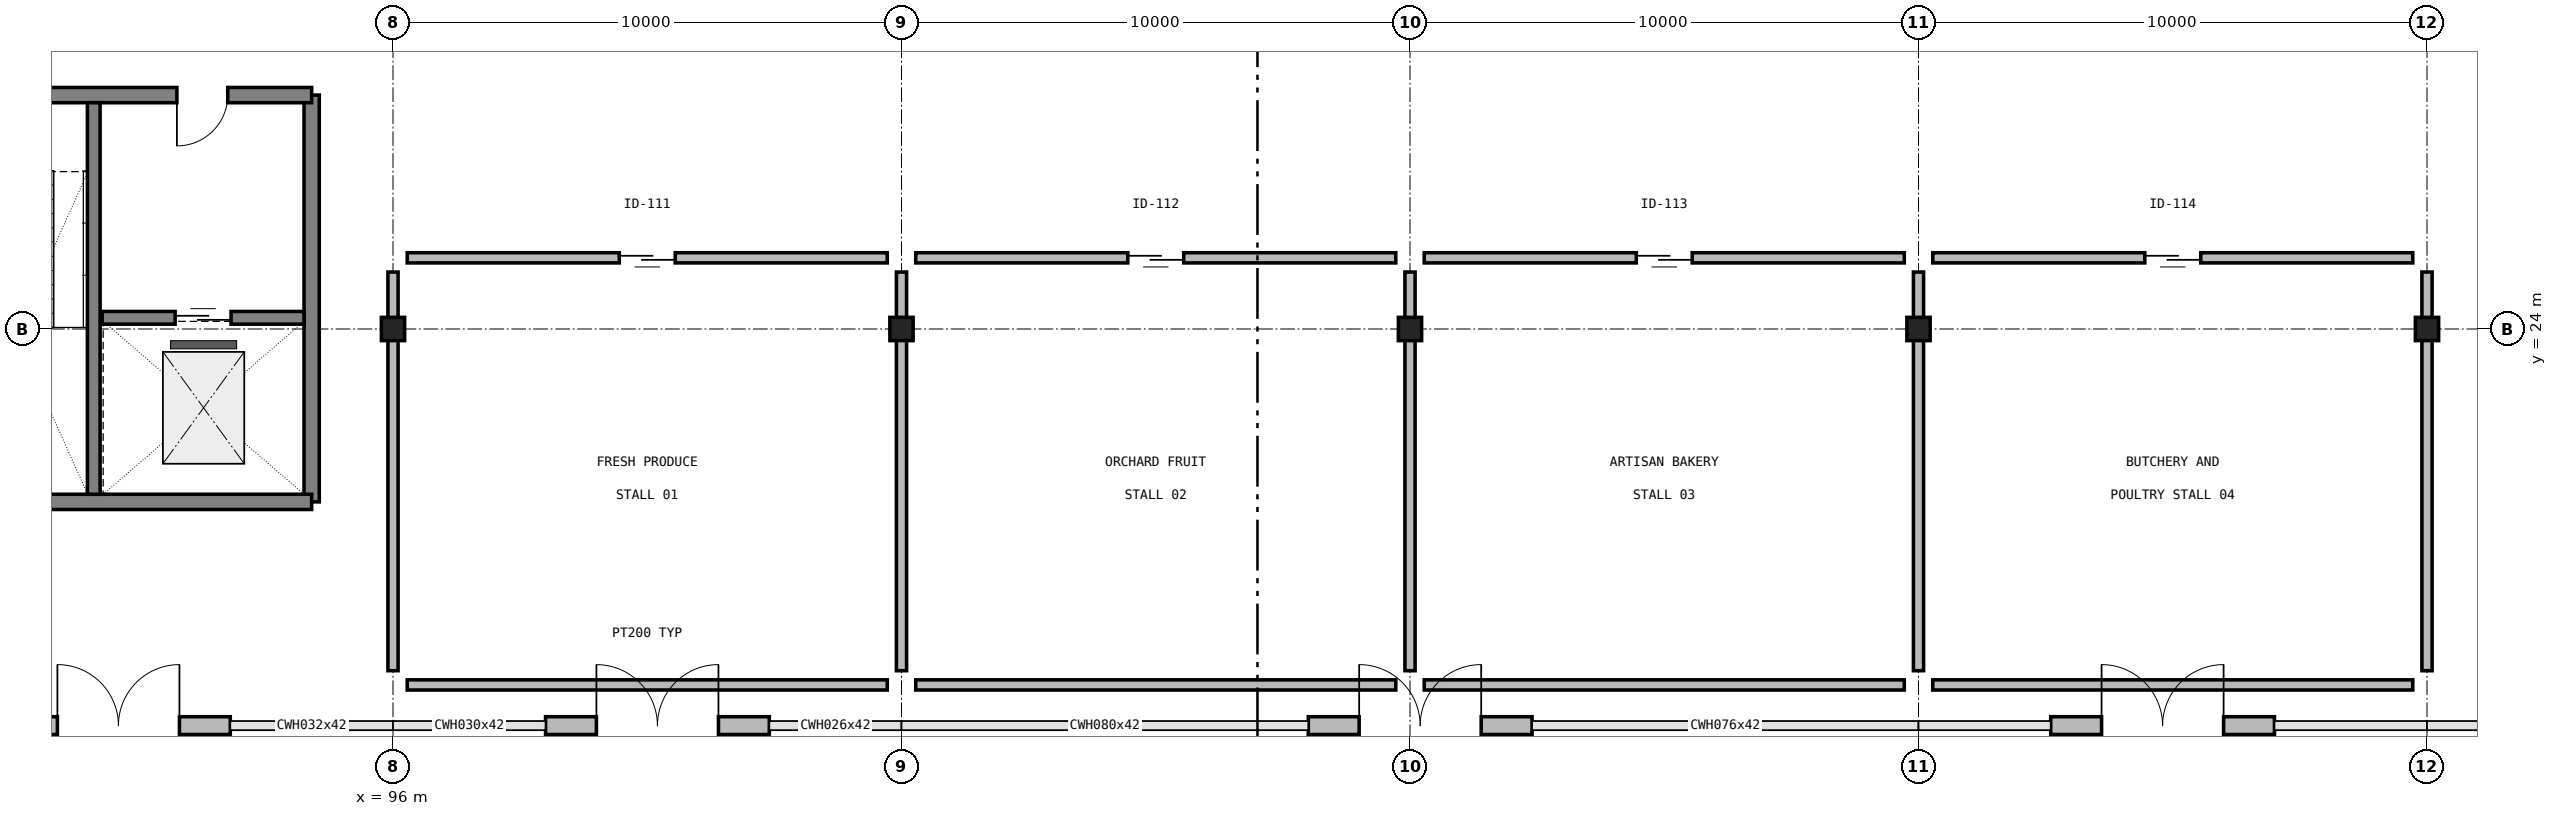
"""IFC4 building model, lengths in metres.
Left out: names, types, materials, properties, quantities, classifications, styles, units other than length and angle.
Written with IfcOpenShell. Run it as: python <this file> out.ifc"""

import sys

from ifc_helpers import new_model, si_unit, direction, frame, frame_2d, origin, origin_2d_with_axis, place, context, subcontext, project, spatial, rectangle, hollow_circle, extrude, element, fill, save


model = new_model("IFC4")
c1 = context("Model", 3, precision=1e-05, world=origin(), true_north=direction((0.0, 1.0)))
c2 = subcontext(c1, "Body", "Model", "MODEL_VIEW")
j1 = project(units=[si_unit("LENGTHUNIT", "METRE"), si_unit("PLANEANGLEUNIT", "RADIAN")], contexts=[c1])
p1 = place(None, origin())
s1 = spatial("IfcSite", under=j1, at=p1, CompositionType="ELEMENT")
p2 = place(p1, origin())
s2 = spatial("IfcBuilding", under=s1, at=p2, CompositionType="ELEMENT")
p3 = place(p2, origin())
s3 = spatial("IfcBuildingStorey", under=s2, at=p3, CompositionType="ELEMENT", Elevation=0.0)
for number, where, z_axis, x_axis in (
    (1, (96.0, 24.0, 0.0), (0.0, 0.0, 1.0), (1.0, 0.0, 0.0)),
    (2, (106.0, 24.0, 0.0), (0.0, 0.0, 1.0), (1.0, 0.0, 0.0)),
    (3, (116.0, 24.0, 0.0), (0.0, 0.0, 1.0), (1.0, 0.0, 0.0)),
    (4, (126.0, 24.0, 0.0), (0.0, 0.0, 1.0), (1.0, 0.0, 0.0)),
    (5, (136.0, 24.0, 0.0), (0.0, 0.0, 1.0), (1.0, 0.0, 0.0)),
):
    element("IfcColumn", number, at=place(p3, frame(where, z_axis=z_axis, x_axis=x_axis)), inside=s3, PredefinedType="COLUMN", context=c2, shape_type="SweptSolid", body=[
        extrude(hollow_circle(Radius=0.229, WallThickness=0.013, at=origin_2d_with_axis()), origin(), (0.0, 0.0, 1.0), 4.5),
    ])
p4 = place(p3, frame((88.4, 16.2, 0.0), z_axis=(0.0, 0.0, 1.0), x_axis=(1.0, 0.0, 0.0)))
e6 = element("IfcWall", 6, at=p4, inside=s3, PredefinedType="SOLIDWALL", context=c2, shape_type="SweptSolid", body=[
    extrude(rectangle(XDim=4.4, YDim=0.35, at=frame_2d((2.2, 0.0), x_axis=(1.0, 0.0))), origin(), (0.0, 0.0, 1.0), 4.24),
])
p5 = place(p4, frame((1.0, 0.0, 0.0)))
e7 = element("IfcOpeningElement", 7, at=p5, cuts=e6, PredefinedType="OPENING", context=c2, shape_type="SweptSolid", body=[
    extrude(rectangle(XDim=2.4, YDim=2.8, at=frame_2d((1.2, 1.4), x_axis=(1.0, 0.0))), frame((0.0, 0.185, 0.0), z_axis=(0.0, -1.0, 0.0), x_axis=(1.0, 0.0, 0.0)), (0.0, 0.0, 1.0), 0.37),
])
p6 = place(p3, frame((99.0, 16.2, 0.0), z_axis=(0.0, 0.0, 1.0), x_axis=(1.0, 0.0, 0.0)))
e8 = element("IfcWall", 8, at=p6, inside=s3, PredefinedType="SOLIDWALL", context=c2, shape_type="SweptSolid", body=[
    extrude(rectangle(XDim=4.4, YDim=0.35, at=frame_2d((2.2, 0.0), x_axis=(1.0, 0.0))), origin(), (0.0, 0.0, 1.0), 4.24),
])
p7 = place(p6, frame((1.0, 0.0, 0.0)))
e9 = element("IfcOpeningElement", 9, at=p7, cuts=e8, PredefinedType="OPENING", context=c2, shape_type="SweptSolid", body=[
    extrude(rectangle(XDim=2.4, YDim=2.8, at=frame_2d((1.2, 1.4), x_axis=(1.0, 0.0))), frame((0.0, 0.185, 0.0), z_axis=(0.0, -1.0, 0.0), x_axis=(1.0, 0.0, 0.0)), (0.0, 0.0, 1.0), 0.37),
])
p8 = place(p3, frame((114.0, 16.2, 0.0), z_axis=(0.0, 0.0, 1.0), x_axis=(1.0, 0.0, 0.0)))
e10 = element("IfcWall", 10, at=p8, inside=s3, PredefinedType="SOLIDWALL", context=c2, shape_type="SweptSolid", body=[
    extrude(rectangle(XDim=4.4, YDim=0.35, at=frame_2d((2.2, 0.0), x_axis=(1.0, 0.0))), origin(), (0.0, 0.0, 1.0), 4.24),
])
p9 = place(p8, frame((1.0, 0.0, 0.0)))
e11 = element("IfcOpeningElement", 11, at=p9, cuts=e10, PredefinedType="OPENING", context=c2, shape_type="SweptSolid", body=[
    extrude(rectangle(XDim=2.4, YDim=2.8, at=frame_2d((1.2, 1.4), x_axis=(1.0, 0.0))), frame((0.0, 0.185, 0.0), z_axis=(0.0, -1.0, 0.0), x_axis=(1.0, 0.0, 0.0)), (0.0, 0.0, 1.0), 0.37),
])
p10 = place(p3, frame((128.6, 16.2, 0.0), z_axis=(0.0, 0.0, 1.0), x_axis=(1.0, 0.0, 0.0)))
e12 = element("IfcWall", 12, at=p10, inside=s3, PredefinedType="SOLIDWALL", context=c2, shape_type="SweptSolid", body=[
    extrude(rectangle(XDim=4.4, YDim=0.35, at=frame_2d((2.2, 0.0), x_axis=(1.0, 0.0))), origin(), (0.0, 0.0, 1.0), 4.24),
])
p11 = place(p10, frame((1.0, 0.0, 0.0)))
e13 = element("IfcOpeningElement", 13, at=p11, cuts=e12, PredefinedType="OPENING", context=c2, shape_type="SweptSolid", body=[
    extrude(rectangle(XDim=2.4, YDim=2.8, at=frame_2d((1.2, 1.4), x_axis=(1.0, 0.0))), frame((0.0, 0.185, 0.0), z_axis=(0.0, -1.0, 0.0), x_axis=(1.0, 0.0, 0.0)), (0.0, 0.0, 1.0), 0.37),
])
p12 = place(p3, frame((94.4, 20.6, 0.0), z_axis=(0.0, 0.0, 1.0), x_axis=(0.0, 1.0, 0.0)))
e14 = element("IfcWall", 14, at=p12, inside=s3, PredefinedType="SHEAR", context=c2, shape_type="SweptSolid", body=[
    extrude(rectangle(XDim=8.0, YDim=0.3, at=frame_2d((4.0, 0.0), x_axis=(1.0, 0.0))), origin(), (0.0, 0.0, 1.0), 4.5),
])
p13 = place(p3, frame((87.0, 20.6, 0.0), z_axis=(0.0, 0.0, 1.0), x_axis=(1.0, 0.0, 0.0)))
e15 = element("IfcWall", 15, at=p13, inside=s3, PredefinedType="SHEAR", context=c2, shape_type="SweptSolid", body=[
    extrude(rectangle(XDim=7.4, YDim=0.3, at=frame_2d((3.7, 0.0), x_axis=(1.0, 0.0))), origin(), (0.0, 0.0, 1.0), 4.5),
])
p14 = place(p3, frame((94.4, 28.6, 0.0), z_axis=(0.0, 0.0, 1.0), x_axis=(-1.0, 0.0, 0.0)))
e16 = element("IfcWall", 16, at=p14, inside=s3, PredefinedType="SHEAR", context=c2, shape_type="SweptSolid", body=[
    extrude(rectangle(XDim=7.4, YDim=0.3, at=frame_2d((3.7, 0.0), x_axis=(1.0, 0.0))), origin(), (0.0, 0.0, 1.0), 4.5),
])
p15 = place(p14, frame((1.65, 0.0, 0.0)))
e17 = element("IfcOpeningElement", 17, at=p15, cuts=e16, PredefinedType="OPENING", context=c2, shape_type="SweptSolid", body=[
    extrude(rectangle(XDim=1.0, YDim=2.15, at=frame_2d((0.5, 1.075), x_axis=(1.0, 0.0))), frame((0.0, 0.16, 0.0), z_axis=(0.0, -1.0, 0.0), x_axis=(1.0, 0.0, 0.0)), (0.0, 0.0, 1.0), 0.32),
])
p16 = place(p14, frame((5.3, 0.0, 0.0)))
e18 = element("IfcOpeningElement", 18, at=p16, cuts=e16, PredefinedType="OPENING", context=c2, shape_type="SweptSolid", body=[
    extrude(rectangle(XDim=1.0, YDim=2.15, at=frame_2d((0.5, 1.075), x_axis=(1.0, 0.0))), frame((0.0, 0.16, 0.0), z_axis=(0.0, -1.0, 0.0), x_axis=(1.0, 0.0, 0.0)), (0.0, 0.0, 1.0), 0.32),
])
p17 = place(p3, frame((90.115, 20.75, 0.0), z_axis=(0.0, 0.0, 1.0), x_axis=(0.0, 1.0, 0.0)))
e19 = element("IfcWall", 19, at=p17, inside=s3, PredefinedType="SHEAR", context=c2, shape_type="SweptSolid", body=[
    extrude(rectangle(XDim=7.7, YDim=0.25, at=frame_2d((3.85, 0.0), x_axis=(1.0, 0.0))), origin(), (0.0, 0.0, 1.0), 4.5),
])
p18 = place(p3, frame((90.28, 24.22, 0.0), z_axis=(0.0, 0.0, 1.0), x_axis=(1.0, 0.0, 0.0)))
e20 = element("IfcWall", 20, at=p18, inside=s3, PredefinedType="SHEAR", context=c2, shape_type="SweptSolid", body=[
    extrude(rectangle(XDim=3.97, YDim=0.25, at=frame_2d((1.985, 0.0), x_axis=(1.0, 0.0))), origin(), (0.0, 0.0, 1.0), 4.24),
])
p19 = place(p18, frame((1.435, 0.0, 0.0)))
e21 = element("IfcOpeningElement", 21, at=p19, cuts=e20, PredefinedType="OPENING", context=c2, shape_type="SweptSolid", body=[
    extrude(rectangle(XDim=1.1, YDim=2.15, at=frame_2d((0.55, 1.075), x_axis=(1.0, 0.0))), frame((0.0, 0.135, 0.0), z_axis=(0.0, -1.0, 0.0), x_axis=(1.0, 0.0, 0.0)), (0.0, 0.0, 1.0), 0.27),
])
p20 = place(p3, frame((96.28, 17.0, 0.0), z_axis=(0.0, 0.0, 1.0), x_axis=(1.0, 0.0, 0.0)))
e22 = element("IfcWall", 22, at=p20, inside=s3, PredefinedType="MOVABLE", context=c2, shape_type="SweptSolid", body=[
    extrude(rectangle(XDim=9.44, YDim=0.2, at=frame_2d((4.72, 0.0), x_axis=(1.0, 0.0))), origin(), (0.0, 0.0, 1.0), 3.62),
])
p21 = place(p3, frame((106.0, 17.28, 0.0), z_axis=(0.0, 0.0, 1.0), x_axis=(0.0, 1.0, 0.0)))
e23 = element("IfcWall", 23, at=p21, inside=s3, PredefinedType="MOVABLE", context=c2, shape_type="SweptSolid", body=[
    extrude(rectangle(XDim=7.84, YDim=0.2, at=frame_2d((3.92, 0.0), x_axis=(1.0, 0.0))), origin(), (0.0, 0.0, 1.0), 3.62),
])
p22 = place(p3, frame((105.72, 25.4, 0.0), z_axis=(0.0, 0.0, 1.0), x_axis=(-1.0, 0.0, 0.0)))
e24 = element("IfcWall", 24, at=p22, inside=s3, PredefinedType="MOVABLE", context=c2, shape_type="SweptSolid", body=[
    extrude(rectangle(XDim=9.44, YDim=0.2, at=frame_2d((4.72, 0.0), x_axis=(1.0, 0.0))), origin(), (0.0, 0.0, 1.0), 3.62),
])
p23 = place(p22, frame((4.17, 0.0, 0.0)))
e25 = element("IfcOpeningElement", 25, at=p23, cuts=e24, PredefinedType="OPENING", context=c2, shape_type="SweptSolid", body=[
    extrude(rectangle(XDim=1.1, YDim=2.15, at=frame_2d((0.55, 1.075), x_axis=(1.0, 0.0))), frame((0.0, 0.11, 0.0), z_axis=(0.0, -1.0, 0.0), x_axis=(1.0, 0.0, 0.0)), (0.0, 0.0, 1.0), 0.22),
])
p24 = place(p3, frame((96.0, 25.12, 0.0), z_axis=(0.0, 0.0, 1.0), x_axis=(0.0, -1.0, 0.0)))
e26 = element("IfcWall", 26, at=p24, inside=s3, PredefinedType="MOVABLE", context=c2, shape_type="SweptSolid", body=[
    extrude(rectangle(XDim=7.84, YDim=0.2, at=frame_2d((3.92, 0.0), x_axis=(1.0, 0.0))), origin(), (0.0, 0.0, 1.0), 3.62),
])
p25 = place(p3, frame((106.28, 17.0, 0.0), z_axis=(0.0, 0.0, 1.0), x_axis=(1.0, 0.0, 0.0)))
e27 = element("IfcWall", 27, at=p25, inside=s3, PredefinedType="MOVABLE", context=c2, shape_type="SweptSolid", body=[
    extrude(rectangle(XDim=9.44, YDim=0.2, at=frame_2d((4.72, 0.0), x_axis=(1.0, 0.0))), origin(), (0.0, 0.0, 1.0), 3.62),
])
p26 = place(p3, frame((116.0, 17.28, 0.0), z_axis=(0.0, 0.0, 1.0), x_axis=(0.0, 1.0, 0.0)))
e28 = element("IfcWall", 28, at=p26, inside=s3, PredefinedType="MOVABLE", context=c2, shape_type="SweptSolid", body=[
    extrude(rectangle(XDim=7.84, YDim=0.2, at=frame_2d((3.92, 0.0), x_axis=(1.0, 0.0))), origin(), (0.0, 0.0, 1.0), 3.62),
])
p27 = place(p3, frame((115.72, 25.4, 0.0), z_axis=(0.0, 0.0, 1.0), x_axis=(-1.0, 0.0, 0.0)))
e29 = element("IfcWall", 29, at=p27, inside=s3, PredefinedType="MOVABLE", context=c2, shape_type="SweptSolid", body=[
    extrude(rectangle(XDim=9.44, YDim=0.2, at=frame_2d((4.72, 0.0), x_axis=(1.0, 0.0))), origin(), (0.0, 0.0, 1.0), 3.62),
])
p28 = place(p27, frame((4.17, 0.0, 0.0)))
e30 = element("IfcOpeningElement", 30, at=p28, cuts=e29, PredefinedType="OPENING", context=c2, shape_type="SweptSolid", body=[
    extrude(rectangle(XDim=1.1, YDim=2.15, at=frame_2d((0.55, 1.075), x_axis=(1.0, 0.0))), frame((0.0, 0.11, 0.0), z_axis=(0.0, -1.0, 0.0), x_axis=(1.0, 0.0, 0.0)), (0.0, 0.0, 1.0), 0.22),
])
p29 = place(p3, frame((116.28, 17.0, 0.0), z_axis=(0.0, 0.0, 1.0), x_axis=(1.0, 0.0, 0.0)))
e31 = element("IfcWall", 31, at=p29, inside=s3, PredefinedType="MOVABLE", context=c2, shape_type="SweptSolid", body=[
    extrude(rectangle(XDim=9.44, YDim=0.2, at=frame_2d((4.72, 0.0), x_axis=(1.0, 0.0))), origin(), (0.0, 0.0, 1.0), 3.62),
])
p30 = place(p3, frame((126.0, 17.28, 0.0), z_axis=(0.0, 0.0, 1.0), x_axis=(0.0, 1.0, 0.0)))
e32 = element("IfcWall", 32, at=p30, inside=s3, PredefinedType="MOVABLE", context=c2, shape_type="SweptSolid", body=[
    extrude(rectangle(XDim=7.84, YDim=0.2, at=frame_2d((3.92, 0.0), x_axis=(1.0, 0.0))), origin(), (0.0, 0.0, 1.0), 3.62),
])
p31 = place(p3, frame((125.72, 25.4, 0.0), z_axis=(0.0, 0.0, 1.0), x_axis=(-1.0, 0.0, 0.0)))
e33 = element("IfcWall", 33, at=p31, inside=s3, PredefinedType="MOVABLE", context=c2, shape_type="SweptSolid", body=[
    extrude(rectangle(XDim=9.44, YDim=0.2, at=frame_2d((4.72, 0.0), x_axis=(1.0, 0.0))), origin(), (0.0, 0.0, 1.0), 3.62),
])
p32 = place(p31, frame((4.17, 0.0, 0.0)))
e34 = element("IfcOpeningElement", 34, at=p32, cuts=e33, PredefinedType="OPENING", context=c2, shape_type="SweptSolid", body=[
    extrude(rectangle(XDim=1.1, YDim=2.15, at=frame_2d((0.55, 1.075), x_axis=(1.0, 0.0))), frame((0.0, 0.11, 0.0), z_axis=(0.0, -1.0, 0.0), x_axis=(1.0, 0.0, 0.0)), (0.0, 0.0, 1.0), 0.22),
])
p33 = place(p3, frame((126.28, 17.0, 0.0), z_axis=(0.0, 0.0, 1.0), x_axis=(1.0, 0.0, 0.0)))
e35 = element("IfcWall", 35, at=p33, inside=s3, PredefinedType="MOVABLE", context=c2, shape_type="SweptSolid", body=[
    extrude(rectangle(XDim=9.44, YDim=0.2, at=frame_2d((4.72, 0.0), x_axis=(1.0, 0.0))), origin(), (0.0, 0.0, 1.0), 3.62),
])
p34 = place(p3, frame((136.0, 17.28, 0.0), z_axis=(0.0, 0.0, 1.0), x_axis=(0.0, 1.0, 0.0)))
e36 = element("IfcWall", 36, at=p34, inside=s3, PredefinedType="MOVABLE", context=c2, shape_type="SweptSolid", body=[
    extrude(rectangle(XDim=7.84, YDim=0.2, at=frame_2d((3.92, 0.0), x_axis=(1.0, 0.0))), origin(), (0.0, 0.0, 1.0), 3.62),
])
p35 = place(p3, frame((135.72, 25.4, 0.0), z_axis=(0.0, 0.0, 1.0), x_axis=(-1.0, 0.0, 0.0)))
e37 = element("IfcWall", 37, at=p35, inside=s3, PredefinedType="MOVABLE", context=c2, shape_type="SweptSolid", body=[
    extrude(rectangle(XDim=9.44, YDim=0.2, at=frame_2d((4.72, 0.0), x_axis=(1.0, 0.0))), origin(), (0.0, 0.0, 1.0), 3.62),
])
p36 = place(p35, frame((4.17, 0.0, 0.0)))
e38 = element("IfcOpeningElement", 38, at=p36, cuts=e37, PredefinedType="OPENING", context=c2, shape_type="SweptSolid", body=[
    extrude(rectangle(XDim=1.1, YDim=2.15, at=frame_2d((0.55, 1.075), x_axis=(1.0, 0.0))), frame((0.0, 0.11, 0.0), z_axis=(0.0, -1.0, 0.0), x_axis=(1.0, 0.0, 0.0)), (0.0, 0.0, 1.0), 0.22),
])
p37 = place(p5, origin())
e39 = element("IfcDoor", 39, at=p37, inside=s3, OperationType="DOUBLE_SWING_LEFT", PredefinedType="DOOR", context=c2, shape_type="SweptSolid", body=[
    extrude(rectangle(XDim=2.4, YDim=2.8, at=frame_2d((1.2, 1.4), x_axis=(1.0, 0.0))), frame((0.0, 0.025, 0.0), z_axis=(0.0, -1.0, 0.0), x_axis=(1.0, 0.0, 0.0)), (0.0, 0.0, 1.0), 0.05),
])
fill(e7, e39)
p38 = place(p7, origin())
e40 = element("IfcDoor", 40, at=p38, inside=s3, OperationType="DOUBLE_SWING_LEFT", PredefinedType="DOOR", context=c2, shape_type="SweptSolid", body=[
    extrude(rectangle(XDim=2.4, YDim=2.8, at=frame_2d((1.2, 1.4), x_axis=(1.0, 0.0))), frame((0.0, 0.025, 0.0), z_axis=(0.0, -1.0, 0.0), x_axis=(1.0, 0.0, 0.0)), (0.0, 0.0, 1.0), 0.05),
])
fill(e9, e40)
p39 = place(p9, origin())
e41 = element("IfcDoor", 41, at=p39, inside=s3, OperationType="DOUBLE_SWING_LEFT", PredefinedType="DOOR", context=c2, shape_type="SweptSolid", body=[
    extrude(rectangle(XDim=2.4, YDim=2.8, at=frame_2d((1.2, 1.4), x_axis=(1.0, 0.0))), frame((0.0, 0.025, 0.0), z_axis=(0.0, -1.0, 0.0), x_axis=(1.0, 0.0, 0.0)), (0.0, 0.0, 1.0), 0.05),
])
fill(e11, e41)
p40 = place(p11, origin())
e42 = element("IfcDoor", 42, at=p40, inside=s3, OperationType="DOUBLE_SWING_LEFT", PredefinedType="DOOR", context=c2, shape_type="SweptSolid", body=[
    extrude(rectangle(XDim=2.4, YDim=2.8, at=frame_2d((1.2, 1.4), x_axis=(1.0, 0.0))), frame((0.0, 0.025, 0.0), z_axis=(0.0, -1.0, 0.0), x_axis=(1.0, 0.0, 0.0)), (0.0, 0.0, 1.0), 0.05),
])
fill(e13, e42)
p41 = place(p15, origin())
e43 = element("IfcDoor", 43, at=p41, inside=s3, OperationType="SINGLE_SWING_RIGHT", PredefinedType="DOOR", context=c2, shape_type="SweptSolid", body=[
    extrude(rectangle(XDim=1.0, YDim=2.15, at=frame_2d((0.5, 1.075), x_axis=(1.0, 0.0))), frame((0.0, 0.025, 0.0), z_axis=(0.0, -1.0, 0.0), x_axis=(1.0, 0.0, 0.0)), (0.0, 0.0, 1.0), 0.05),
])
fill(e17, e43)
p42 = place(p19, origin())
e44 = element("IfcDoor", 44, at=p42, inside=s3, OperationType="SLIDING_TO_LEFT", PredefinedType="DOOR", context=c2, shape_type="SweptSolid", body=[
    extrude(rectangle(XDim=1.1, YDim=2.15, at=frame_2d((0.55, 1.075), x_axis=(1.0, 0.0))), frame((0.0, 0.025, 0.0), z_axis=(0.0, -1.0, 0.0), x_axis=(1.0, 0.0, 0.0)), (0.0, 0.0, 1.0), 0.05),
])
fill(e21, e44)
p43 = place(p23, origin())
e45 = element("IfcDoor", 45, at=p43, inside=s3, OperationType="SLIDING_TO_LEFT", PredefinedType="DOOR", context=c2, shape_type="SweptSolid", body=[
    extrude(rectangle(XDim=1.1, YDim=2.15, at=frame_2d((0.55, 1.075), x_axis=(1.0, 0.0))), frame((0.0, 0.025, 0.0), z_axis=(0.0, -1.0, 0.0), x_axis=(1.0, 0.0, 0.0)), (0.0, 0.0, 1.0), 0.05),
])
fill(e25, e45)
p44 = place(p28, origin())
e46 = element("IfcDoor", 46, at=p44, inside=s3, OperationType="SLIDING_TO_LEFT", PredefinedType="DOOR", context=c2, shape_type="SweptSolid", body=[
    extrude(rectangle(XDim=1.1, YDim=2.15, at=frame_2d((0.55, 1.075), x_axis=(1.0, 0.0))), frame((0.0, 0.025, 0.0), z_axis=(0.0, -1.0, 0.0), x_axis=(1.0, 0.0, 0.0)), (0.0, 0.0, 1.0), 0.05),
])
fill(e30, e46)
p45 = place(p32, origin())
e47 = element("IfcDoor", 47, at=p45, inside=s3, OperationType="SLIDING_TO_LEFT", PredefinedType="DOOR", context=c2, shape_type="SweptSolid", body=[
    extrude(rectangle(XDim=1.1, YDim=2.15, at=frame_2d((0.55, 1.075), x_axis=(1.0, 0.0))), frame((0.0, 0.025, 0.0), z_axis=(0.0, -1.0, 0.0), x_axis=(1.0, 0.0, 0.0)), (0.0, 0.0, 1.0), 0.05),
])
fill(e34, e47)
p46 = place(p36, origin())
e48 = element("IfcDoor", 48, at=p46, inside=s3, OperationType="SLIDING_TO_LEFT", PredefinedType="DOOR", context=c2, shape_type="SweptSolid", body=[
    extrude(rectangle(XDim=1.1, YDim=2.15, at=frame_2d((0.55, 1.075), x_axis=(1.0, 0.0))), frame((0.0, 0.025, 0.0), z_axis=(0.0, -1.0, 0.0), x_axis=(1.0, 0.0, 0.0)), (0.0, 0.0, 1.0), 0.05),
])
fill(e38, e48)
save(model, sys.argv[1])
